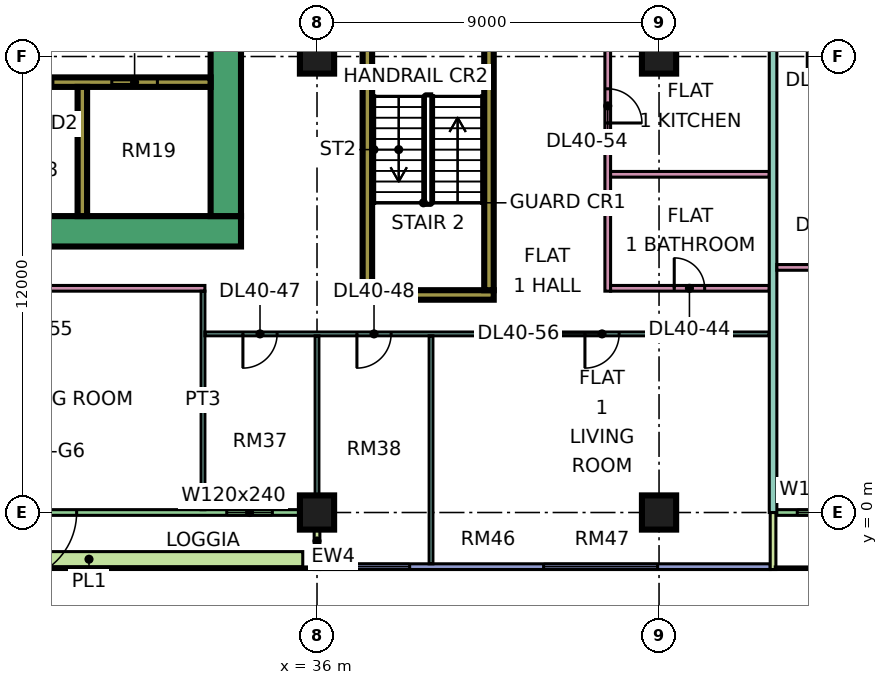
"""IFC4 building model, lengths in metres.
Left out: names, types, materials, properties, quantities, classifications, styles, units other than length and angle.
Written with IfcOpenShell. Run it as: python <this file> out.ifc"""

import sys

from ifc_helpers import new_model, si_unit, direction, frame, frame_2d, origin, origin_2d, place, context, subcontext, project, spatial, rectangle, extrude, element, fill, save


model = new_model("IFC4")
c1 = context("Model", 3, precision=1e-05, world=origin(), true_north=direction((0.0, 1.0)))
c2 = subcontext(c1, "Body", "Model", "MODEL_VIEW")
j1 = project(units=[si_unit("LENGTHUNIT", "METRE"), si_unit("PLANEANGLEUNIT", "RADIAN")], contexts=[c1])
p1 = place(None, origin())
s1 = spatial("IfcSite", under=j1, at=p1, CompositionType="ELEMENT")
p2 = place(p1, origin())
s2 = spatial("IfcBuilding", under=s1, at=p2, CompositionType="ELEMENT")
p3 = place(p2, frame((0.0, 0.0, 176.15)))
s3 = spatial("IfcBuildingStorey", under=s2, at=p3, CompositionType="ELEMENT", Elevation=176.15)
for number, where, z_axis, x_axis in (
    (1, (36.0, 0.0, 0.0), (0.0, 0.0, 1.0), (1.0, 0.0, 0.0)),
    (2, (36.0, 12.0, 0.0), (0.0, 0.0, 1.0), (1.0, 0.0, 0.0)),
    (3, (45.0, 0.0, 0.0), (0.0, 0.0, 1.0), (1.0, 0.0, 0.0)),
    (4, (45.0, 12.0, 0.0), (0.0, 0.0, 1.0), (1.0, 0.0, 0.0)),
):
    element("IfcColumn", number, at=place(p3, frame(where, z_axis=z_axis, x_axis=x_axis)), inside=s3, PredefinedType="COLUMN", context=c2, shape_type="SweptSolid", body=[
        extrude(rectangle(XDim=0.9, YDim=0.9, at=origin_2d()), origin(), (0.0, 0.0, 1.0), 3.75),
    ])
p4 = place(p3, frame((9.0, 7.4, 0.0), z_axis=(0.0, 0.0, 1.0), x_axis=(1.0, 0.0, 0.0)))
e5 = element("IfcWall", 5, at=p4, inside=s3, PredefinedType="SHEAR", context=c2, shape_type="SweptSolid", body=[
    extrude(rectangle(XDim=25.0, YDim=0.8, at=frame_2d((12.5, 0.0))), origin(), (0.0, 0.0, 1.0), 3.75),
])
p5 = place(p3, frame((33.6, 7.8, 0.0), z_axis=(0.0, 0.0, 1.0), x_axis=(0.0, 1.0, 0.0)))
e6 = element("IfcWall", 6, at=p5, inside=s3, PredefinedType="SHEAR", context=c2, shape_type="SweptSolid", body=[
    extrude(rectangle(XDim=11.4, YDim=0.8, at=frame_2d((5.7, 0.0))), origin(), (0.0, 0.0, 1.0), 3.75),
])
p6 = place(p5, frame((5.4, 0.0, 0.0)))
e7 = element("IfcOpeningElement", 7, at=p6, cuts=e6, PredefinedType="OPENING", context=c2, shape_type="SweptSolid", body=[
    extrude(rectangle(XDim=1.8, YDim=2.4, at=frame_2d((0.9, 1.2))), frame((0.0, 0.41, 0.0), z_axis=(0.0, -1.0, 0.0), x_axis=(1.0, 0.0, 0.0)), (0.0, 0.0, 1.0), 0.82),
])
p7 = place(p3, frame((13.45, 11.325, 0.0), z_axis=(0.0, 0.0, 1.0), x_axis=(1.0, 0.0, 0.0)))
e8 = element("IfcWall", 8, at=p7, inside=s3, PredefinedType="SHEAR", context=c2, shape_type="SweptSolid", body=[
    extrude(rectangle(XDim=19.75, YDim=0.25, at=frame_2d((9.875, 0.0))), origin(), (0.0, 0.0, 1.0), 3.75),
])
p8 = place(p7, frame((11.65, 0.0, 0.0)))
e9 = element("IfcOpeningElement", 9, at=p8, cuts=e8, PredefinedType="OPENING", context=c2, shape_type="SweptSolid", body=[
    extrude(rectangle(XDim=1.2, YDim=2.2, at=frame_2d((0.6, 1.1))), frame((0.0, 0.135, 0.0), z_axis=(0.0, -1.0, 0.0), x_axis=(1.0, 0.0, 0.0)), (0.0, 0.0, 1.0), 0.27),
])
p9 = place(p7, frame((14.4, 0.0, 0.0)))
e10 = element("IfcOpeningElement", 10, at=p9, cuts=e8, PredefinedType="OPENING", context=c2, shape_type="SweptSolid", body=[
    extrude(rectangle(XDim=1.2, YDim=2.2, at=frame_2d((0.6, 1.1))), frame((0.0, 0.135, 0.0), z_axis=(0.0, -1.0, 0.0), x_axis=(1.0, 0.0, 0.0)), (0.0, 0.0, 1.0), 0.27),
])
p10 = place(p7, frame((17.15, 0.0, 0.0)))
e11 = element("IfcOpeningElement", 11, at=p10, cuts=e8, PredefinedType="OPENING", context=c2, shape_type="SweptSolid", body=[
    extrude(rectangle(XDim=1.2, YDim=2.2, at=frame_2d((0.6, 1.1))), frame((0.0, 0.135, 0.0), z_axis=(0.0, -1.0, 0.0), x_axis=(1.0, 0.0, 0.0)), (0.0, 0.0, 1.0), 0.27),
])
p11 = place(p7, frame((1.55, 0.0, 0.0)))
e12 = element("IfcOpeningElement", 12, at=p11, cuts=e8, PredefinedType="OPENING", context=c2, shape_type="SweptSolid", body=[
    extrude(rectangle(XDim=0.9, YDim=2.1, at=frame_2d((0.45, 1.05))), frame((0.0, 0.135, 0.0), z_axis=(0.0, -1.0, 0.0), x_axis=(1.0, 0.0, 0.0)), (0.0, 0.0, 1.0), 0.27),
])
p12 = place(p7, frame((5.05, 0.0, 0.0)))
e13 = element("IfcOpeningElement", 13, at=p12, cuts=e8, PredefinedType="OPENING", context=c2, shape_type="SweptSolid", body=[
    extrude(rectangle(XDim=0.9, YDim=2.1, at=frame_2d((0.45, 1.05))), frame((0.0, 0.135, 0.0), z_axis=(0.0, -1.0, 0.0), x_axis=(1.0, 0.0, 0.0)), (0.0, 0.0, 1.0), 0.27),
])
p13 = place(p7, frame((8.425, 0.0, 0.0)))
e14 = element("IfcOpeningElement", 14, at=p13, cuts=e8, PredefinedType="OPENING", context=c2, shape_type="SweptSolid", body=[
    extrude(rectangle(XDim=0.9, YDim=2.1, at=frame_2d((0.45, 1.05))), frame((0.0, 0.135, 0.0), z_axis=(0.0, -1.0, 0.0), x_axis=(1.0, 0.0, 0.0)), (0.0, 0.0, 1.0), 0.27),
])
p14 = place(p3, frame((29.825, 7.8, 0.0), z_axis=(0.0, 0.0, 1.0), x_axis=(0.0, 1.0, 0.0)))
e15 = element("IfcWall", 15, at=p14, inside=s3, PredefinedType="SHEAR", context=c2, shape_type="SweptSolid", body=[
    extrude(rectangle(XDim=3.4, YDim=0.25, at=frame_2d((1.7, 0.0))), origin(), (0.0, 0.0, 1.0), 3.75),
])
p15 = place(p3, frame((37.2, 5.725, 0.0), z_axis=(0.0, 0.0, 1.0), x_axis=(1.0, 0.0, 0.0)))
e16 = element("IfcWall", 16, at=p15, inside=s3, PredefinedType="SHEAR", context=c2, shape_type="SweptSolid", body=[
    extrude(rectangle(XDim=3.45, YDim=0.25, at=frame_2d((1.725, 0.0))), origin(), (0.0, 0.0, 1.0), 3.75),
])
for number, where, z_axis, x_axis in (
    (17, (37.325, 5.85, 0.0), (0.0, 0.0, 1.0), (0.0, 1.0, 0.0)),
    (18, (40.525, 5.85, 0.0), (0.0, 0.0, 1.0), (0.0, 1.0, 0.0)),
):
    element("IfcWall", number, at=place(p3, frame(where, z_axis=z_axis, x_axis=x_axis)), inside=s3, PredefinedType="SHEAR", context=c2, shape_type="SweptSolid", body=[
        extrude(rectangle(XDim=6.5, YDim=0.25, at=frame_2d((3.25, 0.0))), origin(), (0.0, 0.0, 1.0), 3.75),
    ])
p16 = place(p3, frame((24.075, 0.0, 0.0), z_axis=(0.0, 0.0, 1.0), x_axis=(1.0, 0.0, 0.0)))
e19 = element("IfcWall", 19, at=p16, inside=s3, PredefinedType="SOLIDWALL", context=c2, shape_type="SweptSolid", body=[
    extrude(rectangle(XDim=11.85, YDim=0.15, at=frame_2d((5.925, 0.0))), origin(), (0.0, 0.0, 1.0), 3.35),
])
p17 = place(p16, frame((3.8, 0.0, 0.0)))
e20 = element("IfcOpeningElement", 20, at=p17, cuts=e19, PredefinedType="OPENING", context=c2, shape_type="SweptSolid", body=[
    extrude(rectangle(XDim=1.8, YDim=2.4, at=frame_2d((0.9, 1.2))), frame((0.0, 0.085, 0.0), z_axis=(0.0, -1.0, 0.0), x_axis=(1.0, 0.0, 0.0)), (0.0, 0.0, 1.0), 0.17),
])
p18 = place(p16, frame((9.55, 0.0, 0.45)))
e21 = element("IfcOpeningElement", 21, at=p18, cuts=e19, PredefinedType="OPENING", context=c2, shape_type="SweptSolid", body=[
    extrude(rectangle(XDim=1.2, YDim=2.4, at=frame_2d((0.6, 1.2))), frame((0.0, 0.085, 0.0), z_axis=(0.0, -1.0, 0.0), x_axis=(1.0, 0.0, 0.0)), (0.0, 0.0, 1.0), 0.17),
])
p19 = place(p3, frame((36.0, -1.5, 0.0), z_axis=(0.0, 0.0, 1.0), x_axis=(0.0, 1.0, 0.0)))
e22 = element("IfcWall", 22, at=p19, inside=s3, PredefinedType="SOLIDWALL", context=c2, shape_type="SweptSolid", body=[
    extrude(rectangle(XDim=1.5, YDim=0.15, at=frame_2d((0.75, 0.0))), origin(), (0.0, 0.0, 1.0), 3.35),
])
p20 = place(p3, frame((36.075, -1.425, 0.0), z_axis=(0.0, 0.0, 1.0), x_axis=(1.0, 0.0, 0.0)))
e23 = element("IfcWall", 23, at=p20, inside=s3, PredefinedType="SOLIDWALL", context=c2, shape_type="SweptSolid", body=[
    extrude(rectangle(XDim=11.85, YDim=0.15, at=frame_2d((5.925, 0.0))), origin(), (0.0, 0.0, 1.0), 3.35),
])
p21 = place(p20, frame((0.562, 0.0, 0.45)))
e24 = element("IfcOpeningElement", 24, at=p21, cuts=e23, PredefinedType="OPENING", context=c2, shape_type="SweptSolid", body=[
    extrude(rectangle(XDim=1.8, YDim=2.4, at=frame_2d((0.9, 1.2))), frame((0.0, 0.085, 0.0), z_axis=(0.0, -1.0, 0.0), x_axis=(1.0, 0.0, 0.0)), (0.0, 0.0, 1.0), 0.17),
])
p22 = place(p20, frame((5.887, 0.0, 0.45)))
e25 = element("IfcOpeningElement", 25, at=p22, cuts=e23, PredefinedType="OPENING", context=c2, shape_type="SweptSolid", body=[
    extrude(rectangle(XDim=3.0, YDim=2.4, at=frame_2d((1.5, 1.2))), frame((0.0, 0.085, 0.0), z_axis=(0.0, -1.0, 0.0), x_axis=(1.0, 0.0, 0.0)), (0.0, 0.0, 1.0), 0.17),
])
p23 = place(p3, frame((48.075, 0.0, 0.0), z_axis=(0.0, 0.0, 1.0), x_axis=(1.0, 0.0, 0.0)))
e26 = element("IfcWall", 26, at=p23, inside=s3, PredefinedType="SOLIDWALL", context=c2, shape_type="SweptSolid", body=[
    extrude(rectangle(XDim=13.35, YDim=0.15, at=frame_2d((6.675, 0.0))), origin(), (0.0, 0.0, 1.0), 3.35),
])
p24 = place(p23, frame((0.562, 0.0, 0.45)))
e27 = element("IfcOpeningElement", 27, at=p24, cuts=e26, PredefinedType="OPENING", context=c2, shape_type="SweptSolid", body=[
    extrude(rectangle(XDim=1.8, YDim=2.4, at=frame_2d((0.9, 1.2))), frame((0.0, 0.085, 0.0), z_axis=(0.0, -1.0, 0.0), x_axis=(1.0, 0.0, 0.0)), (0.0, 0.0, 1.0), 0.17),
])
p25 = place(p23, frame((3.55, 0.0, 0.0)))
e28 = element("IfcOpeningElement", 28, at=p25, cuts=e26, PredefinedType="OPENING", context=c2, shape_type="SweptSolid", body=[
    extrude(rectangle(XDim=1.2, YDim=2.4, at=frame_2d((0.6, 1.2))), frame((0.0, 0.085, 0.0), z_axis=(0.0, -1.0, 0.0), x_axis=(1.0, 0.0, 0.0)), (0.0, 0.0, 1.0), 0.17),
])
p26 = place(p23, frame((7.1, 0.0, 0.45)))
e29 = element("IfcOpeningElement", 29, at=p26, cuts=e26, PredefinedType="OPENING", context=c2, shape_type="SweptSolid", body=[
    extrude(rectangle(XDim=1.2, YDim=2.4, at=frame_2d((0.6, 1.2))), frame((0.0, 0.085, 0.0), z_axis=(0.0, -1.0, 0.0), x_axis=(1.0, 0.0, 0.0)), (0.0, 0.0, 1.0), 0.17),
])
p27 = place(p23, frame((9.637, 0.0, 0.45)))
e30 = element("IfcOpeningElement", 30, at=p27, cuts=e26, PredefinedType="OPENING", context=c2, shape_type="SweptSolid", body=[
    extrude(rectangle(XDim=3.0, YDim=2.4, at=frame_2d((1.5, 1.2))), frame((0.0, 0.085, 0.0), z_axis=(0.0, -1.0, 0.0), x_axis=(1.0, 0.0, 0.0)), (0.0, 0.0, 1.0), 0.17),
])
p28 = place(p3, frame((48.0, -1.5, 0.0), z_axis=(0.0, 0.0, 1.0), x_axis=(0.0, 1.0, 0.0)))
e31 = element("IfcWall", 31, at=p28, inside=s3, PredefinedType="SOLIDWALL", context=c2, shape_type="SweptSolid", body=[
    extrude(rectangle(XDim=1.5, YDim=0.15, at=frame_2d((0.75, 0.0))), origin(), (0.0, 0.0, 1.0), 3.35),
])
p29 = place(p3, frame((24.375, -1.229, 0.0), z_axis=(0.0, 0.0, 1.0), x_axis=(1.0, 0.0, 0.0)))
e32 = element("IfcWall", 32, at=p29, inside=s3, PredefinedType="SOLIDWALL", context=c2, shape_type="SweptSolid", body=[
    extrude(rectangle(XDim=11.25, YDim=0.4, at=frame_2d((5.625, 0.0))), origin(), (0.0, 0.0, 1.0), 0.7),
])
p30 = place(p3, frame((11.95, 5.9, 0.0), z_axis=(0.0, 0.0, 1.0), x_axis=(1.0, 0.0, 0.0)))
e33 = element("IfcWall", 33, at=p30, inside=s3, PredefinedType="PARTITIONING", context=c2, shape_type="SweptSolid", body=[
    extrude(rectangle(XDim=21.1, YDim=0.15, at=frame_2d((10.55, 0.0))), origin(), (0.0, 0.0, 1.0), 3.35),
])
p31 = place(p30, frame((1.1, 0.0, 0.0)))
e34 = element("IfcOpeningElement", 34, at=p31, cuts=e33, PredefinedType="OPENING", context=c2, shape_type="SweptSolid", body=[
    extrude(rectangle(XDim=0.9, YDim=2.1, at=frame_2d((0.45, 1.05))), frame((0.0, 0.085, 0.0), z_axis=(0.0, -1.0, 0.0), x_axis=(1.0, 0.0, 0.0)), (0.0, 0.0, 1.0), 0.17),
])
p32 = place(p30, frame((4.1, 0.0, 0.0)))
e35 = element("IfcOpeningElement", 35, at=p32, cuts=e33, PredefinedType="OPENING", context=c2, shape_type="SweptSolid", body=[
    extrude(rectangle(XDim=0.9, YDim=2.1, at=frame_2d((0.45, 1.05))), frame((0.0, 0.085, 0.0), z_axis=(0.0, -1.0, 0.0), x_axis=(1.0, 0.0, 0.0)), (0.0, 0.0, 1.0), 0.17),
])
p33 = place(p30, frame((10.1, 0.0, 0.0)))
e36 = element("IfcOpeningElement", 36, at=p33, cuts=e33, PredefinedType="OPENING", context=c2, shape_type="SweptSolid", body=[
    extrude(rectangle(XDim=0.9, YDim=2.1, at=frame_2d((0.45, 1.05))), frame((0.0, 0.085, 0.0), z_axis=(0.0, -1.0, 0.0), x_axis=(1.0, 0.0, 0.0)), (0.0, 0.0, 1.0), 0.17),
])
p34 = place(p30, frame((16.1, 0.0, 0.0)))
e37 = element("IfcOpeningElement", 37, at=p34, cuts=e33, PredefinedType="OPENING", context=c2, shape_type="SweptSolid", body=[
    extrude(rectangle(XDim=0.9, YDim=2.1, at=frame_2d((0.45, 1.05))), frame((0.0, 0.085, 0.0), z_axis=(0.0, -1.0, 0.0), x_axis=(1.0, 0.0, 0.0)), (0.0, 0.0, 1.0), 0.17),
])
p35 = place(p3, frame((33.0, 0.074, 0.0), z_axis=(0.0, 0.0, 1.0), x_axis=(0.0, 1.0, 0.0)))
e38 = element("IfcWall", 38, at=p35, inside=s3, PredefinedType="PARTITIONING", context=c2, shape_type="SweptSolid", body=[
    extrude(rectangle(XDim=5.751, YDim=0.1, at=frame_2d((2.875, 0.0))), origin(), (0.0, 0.0, 1.0), 3.35),
])
p36 = place(p3, frame((33.05, 4.7, 0.0), z_axis=(0.0, 0.0, 1.0), x_axis=(1.0, 0.0, 0.0)))
e39 = element("IfcWall", 39, at=p36, inside=s3, PredefinedType="PARTITIONING", context=c2, shape_type="SweptSolid", body=[
    extrude(rectangle(XDim=14.85, YDim=0.1, at=frame_2d((7.425, 0.0))), origin(), (0.0, 0.0, 1.0), 3.35),
])
p37 = place(p36, frame((1.0, 0.0, 0.0)))
e40 = element("IfcOpeningElement", 40, at=p37, cuts=e39, PredefinedType="OPENING", context=c2, shape_type="SweptSolid", body=[
    extrude(rectangle(XDim=0.9, YDim=2.1, at=frame_2d((0.45, 1.05))), frame((0.0, 0.06, 0.0), z_axis=(0.0, -1.0, 0.0), x_axis=(1.0, 0.0, 0.0)), (0.0, 0.0, 1.0), 0.12),
])
p38 = place(p36, frame((4.0, 0.0, 0.0)))
e41 = element("IfcOpeningElement", 41, at=p38, cuts=e39, PredefinedType="OPENING", context=c2, shape_type="SweptSolid", body=[
    extrude(rectangle(XDim=0.9, YDim=2.1, at=frame_2d((0.45, 1.05))), frame((0.0, 0.06, 0.0), z_axis=(0.0, -1.0, 0.0), x_axis=(1.0, 0.0, 0.0)), (0.0, 0.0, 1.0), 0.12),
])
p39 = place(p36, frame((10.0, 0.0, 0.0)))
e42 = element("IfcOpeningElement", 42, at=p39, cuts=e39, PredefinedType="OPENING", context=c2, shape_type="SweptSolid", body=[
    extrude(rectangle(XDim=0.9, YDim=2.1, at=frame_2d((0.45, 1.05))), frame((0.0, 0.06, 0.0), z_axis=(0.0, -1.0, 0.0), x_axis=(1.0, 0.0, 0.0)), (0.0, 0.0, 1.0), 0.12),
])
p40 = place(p3, frame((36.0, 0.0, 0.0), z_axis=(0.0, 0.0, 1.0), x_axis=(0.0, 1.0, 0.0)))
e43 = element("IfcWall", 43, at=p40, inside=s3, PredefinedType="PARTITIONING", context=c2, shape_type="SweptSolid", body=[
    extrude(rectangle(XDim=4.65, YDim=0.1, at=frame_2d((2.325, 0.0))), origin(), (0.0, 0.0, 1.0), 3.35),
])
p41 = place(p3, frame((39.0, -1.35, 0.0), z_axis=(0.0, 0.0, 1.0), x_axis=(0.0, 1.0, 0.0)))
e44 = element("IfcWall", 44, at=p41, inside=s3, PredefinedType="PARTITIONING", context=c2, shape_type="SweptSolid", body=[
    extrude(rectangle(XDim=6.0, YDim=0.1, at=frame_2d((3.0, 0.0))), origin(), (0.0, 0.0, 1.0), 3.35),
])
p42 = place(p3, frame((43.65, 5.825, 0.0), z_axis=(0.0, 0.0, 1.0), x_axis=(0.0, 1.0, 0.0)))
e45 = element("IfcWall", 45, at=p42, inside=s3, PredefinedType="PARTITIONING", context=c2, shape_type="SweptSolid", body=[
    extrude(rectangle(XDim=6.525, YDim=0.15, at=frame_2d((3.263, 0.0))), origin(), (0.0, 0.0, 1.0), 3.35),
])
p43 = place(p42, frame((4.425, 0.0, 0.0)))
e46 = element("IfcOpeningElement", 46, at=p43, cuts=e45, PredefinedType="OPENING", context=c2, shape_type="SweptSolid", body=[
    extrude(rectangle(XDim=0.9, YDim=2.1, at=frame_2d((0.45, 1.05))), frame((0.0, 0.085, 0.0), z_axis=(0.0, -1.0, 0.0), x_axis=(1.0, 0.0, 0.0)), (0.0, 0.0, 1.0), 0.17),
])
p44 = place(p3, frame((43.725, 5.9, 0.0), z_axis=(0.0, 0.0, 1.0), x_axis=(1.0, 0.0, 0.0)))
e47 = element("IfcWall", 47, at=p44, inside=s3, PredefinedType="PARTITIONING", context=c2, shape_type="SweptSolid", body=[
    extrude(rectangle(XDim=4.175, YDim=0.15, at=frame_2d((2.087, 0.0))), origin(), (0.0, 0.0, 1.0), 3.35),
])
p45 = place(p44, frame((1.675, 0.0, 0.0)))
e48 = element("IfcOpeningElement", 48, at=p45, cuts=e47, PredefinedType="OPENING", context=c2, shape_type="SweptSolid", body=[
    extrude(rectangle(XDim=0.8, YDim=2.1, at=frame_2d((0.4, 1.05))), frame((0.0, 0.085, 0.0), z_axis=(0.0, -1.0, 0.0), x_axis=(1.0, 0.0, 0.0)), (0.0, 0.0, 1.0), 0.17),
])
p46 = place(p3, frame((43.725, 8.9, 0.0), z_axis=(0.0, 0.0, 1.0), x_axis=(1.0, 0.0, 0.0)))
e49 = element("IfcWall", 49, at=p46, inside=s3, PredefinedType="PARTITIONING", context=c2, shape_type="SweptSolid", body=[
    extrude(rectangle(XDim=4.175, YDim=0.15, at=frame_2d((2.087, 0.0))), origin(), (0.0, 0.0, 1.0), 3.35),
])
p47 = place(p3, frame((48.0, 0.0, 0.0), z_axis=(0.0, 0.0, 1.0), x_axis=(0.0, 1.0, 0.0)))
e50 = element("IfcWall", 50, at=p47, inside=s3, PredefinedType="PARTITIONING", context=c2, shape_type="SweptSolid", body=[
    extrude(rectangle(XDim=12.35, YDim=0.2, at=frame_2d((6.175, 0.0))), origin(), (0.0, 0.0, 1.0), 3.35),
])
p48 = place(p3, frame((48.1, 6.45, 0.0), z_axis=(0.0, 0.0, 1.0), x_axis=(1.0, 0.0, 0.0)))
e51 = element("IfcWall", 51, at=p48, inside=s3, PredefinedType="PARTITIONING", context=c2, shape_type="SweptSolid", body=[
    extrude(rectangle(XDim=8.95, YDim=0.15, at=frame_2d((4.475, 0.0))), origin(), (0.0, 0.0, 1.0), 3.35),
])
p49 = place(p48, frame((0.95, 0.0, 0.0)))
e52 = element("IfcOpeningElement", 52, at=p49, cuts=e51, PredefinedType="OPENING", context=c2, shape_type="SweptSolid", body=[
    extrude(rectangle(XDim=0.9, YDim=2.1, at=frame_2d((0.45, 1.05))), frame((0.0, 0.085, 0.0), z_axis=(0.0, -1.0, 0.0), x_axis=(1.0, 0.0, 0.0)), (0.0, 0.0, 1.0), 0.17),
])
p50 = place(p48, frame((6.95, 0.0, 0.0)))
e53 = element("IfcOpeningElement", 53, at=p50, cuts=e51, PredefinedType="OPENING", context=c2, shape_type="SweptSolid", body=[
    extrude(rectangle(XDim=0.9, YDim=2.1, at=frame_2d((0.45, 1.05))), frame((0.0, 0.085, 0.0), z_axis=(0.0, -1.0, 0.0), x_axis=(1.0, 0.0, 0.0)), (0.0, 0.0, 1.0), 0.17),
])
p51 = place(p17, frame((1.8, 0.0, 0.0), z_axis=(0.0, 0.0, 1.0), x_axis=(-1.0, 0.0, 0.0)))
e54 = element("IfcDoor", 54, at=p51, inside=s3, OperationType="DOUBLE_DOOR_SINGLE_SWING", PredefinedType="DOOR", context=c2, shape_type="SweptSolid", body=[
    extrude(rectangle(XDim=1.8, YDim=2.4, at=frame_2d((0.9, 1.2))), frame((0.0, 0.025, 0.0), z_axis=(0.0, -1.0, 0.0), x_axis=(1.0, 0.0, 0.0)), (0.0, 0.0, 1.0), 0.05),
])
fill(e20, e54)
p52 = place(p18, origin())
e55 = element("IfcWindow", 55, at=p52, inside=s3, PartitioningType="SINGLE_PANEL", PredefinedType="WINDOW", context=c2, shape_type="SweptSolid", body=[
    extrude(rectangle(XDim=1.2, YDim=2.4, at=frame_2d((0.6, 1.2))), frame((0.0, 0.03, 0.0), z_axis=(0.0, -1.0, 0.0), x_axis=(1.0, 0.0, 0.0)), (0.0, 0.0, 1.0), 0.06),
])
fill(e21, e55)
p53 = place(p21, origin())
e56 = element("IfcWindow", 56, at=p53, inside=s3, PartitioningType="SINGLE_PANEL", PredefinedType="WINDOW", context=c2, shape_type="SweptSolid", body=[
    extrude(rectangle(XDim=1.8, YDim=2.4, at=frame_2d((0.9, 1.2))), frame((0.0, 0.03, 0.0), z_axis=(0.0, -1.0, 0.0), x_axis=(1.0, 0.0, 0.0)), (0.0, 0.0, 1.0), 0.06),
])
fill(e24, e56)
p54 = place(p22, origin())
e57 = element("IfcWindow", 57, at=p54, inside=s3, PartitioningType="SINGLE_PANEL", PredefinedType="WINDOW", context=c2, shape_type="SweptSolid", body=[
    extrude(rectangle(XDim=3.0, YDim=2.4, at=frame_2d((1.5, 1.2))), frame((0.0, 0.03, 0.0), z_axis=(0.0, -1.0, 0.0), x_axis=(1.0, 0.0, 0.0)), (0.0, 0.0, 1.0), 0.06),
])
fill(e25, e57)
p55 = place(p24, origin())
e58 = element("IfcWindow", 58, at=p55, inside=s3, PartitioningType="SINGLE_PANEL", PredefinedType="WINDOW", context=c2, shape_type="SweptSolid", body=[
    extrude(rectangle(XDim=1.8, YDim=2.4, at=frame_2d((0.9, 1.2))), frame((0.0, 0.03, 0.0), z_axis=(0.0, -1.0, 0.0), x_axis=(1.0, 0.0, 0.0)), (0.0, 0.0, 1.0), 0.06),
])
fill(e27, e58)
p56 = place(p9, origin())
e59 = element("IfcDoor", 59, at=p56, inside=s3, OperationType="DOUBLE_DOOR_SLIDING", PredefinedType="DOOR", context=c2, shape_type="SweptSolid", body=[
    extrude(rectangle(XDim=1.2, YDim=2.2, at=frame_2d((0.6, 1.1))), frame((0.0, 0.025, 0.0), z_axis=(0.0, -1.0, 0.0), x_axis=(1.0, 0.0, 0.0)), (0.0, 0.0, 1.0), 0.05),
])
fill(e10, e59)
p57 = place(p10, origin())
e60 = element("IfcDoor", 60, at=p57, inside=s3, OperationType="DOUBLE_DOOR_SLIDING", PredefinedType="DOOR", context=c2, shape_type="SweptSolid", body=[
    extrude(rectangle(XDim=1.2, YDim=2.2, at=frame_2d((0.6, 1.1))), frame((0.0, 0.025, 0.0), z_axis=(0.0, -1.0, 0.0), x_axis=(1.0, 0.0, 0.0)), (0.0, 0.0, 1.0), 0.05),
])
fill(e11, e60)
p58 = place(p45, origin())
e61 = element("IfcDoor", 61, at=p58, inside=s3, OperationType="SINGLE_SWING_LEFT", PredefinedType="DOOR", context=c2, shape_type="SweptSolid", body=[
    extrude(rectangle(XDim=0.8, YDim=2.1, at=frame_2d((0.4, 1.05))), frame((0.0, 0.025, 0.0), z_axis=(0.0, -1.0, 0.0), x_axis=(1.0, 0.0, 0.0)), (0.0, 0.0, 1.0), 0.05),
])
fill(e48, e61)
p59 = place(p37, frame((0.9, 0.0, 0.0), z_axis=(0.0, 0.0, 1.0), x_axis=(-1.0, 0.0, 0.0)))
e62 = element("IfcDoor", 62, at=p59, inside=s3, OperationType="SINGLE_SWING_LEFT", PredefinedType="DOOR", context=c2, shape_type="SweptSolid", body=[
    extrude(rectangle(XDim=0.9, YDim=2.1, at=frame_2d((0.45, 1.05))), frame((0.0, 0.025, 0.0), z_axis=(0.0, -1.0, 0.0), x_axis=(1.0, 0.0, 0.0)), (0.0, 0.0, 1.0), 0.05),
])
fill(e40, e62)
p60 = place(p38, frame((0.9, 0.0, 0.0), z_axis=(0.0, 0.0, 1.0), x_axis=(-1.0, 0.0, 0.0)))
e63 = element("IfcDoor", 63, at=p60, inside=s3, OperationType="SINGLE_SWING_LEFT", PredefinedType="DOOR", context=c2, shape_type="SweptSolid", body=[
    extrude(rectangle(XDim=0.9, YDim=2.1, at=frame_2d((0.45, 1.05))), frame((0.0, 0.025, 0.0), z_axis=(0.0, -1.0, 0.0), x_axis=(1.0, 0.0, 0.0)), (0.0, 0.0, 1.0), 0.05),
])
fill(e41, e63)
p61 = place(p43, frame((0.9, 0.0, 0.0), z_axis=(0.0, 0.0, 1.0), x_axis=(-1.0, 0.0, 0.0)))
e64 = element("IfcDoor", 64, at=p61, inside=s3, OperationType="SINGLE_SWING_LEFT", PredefinedType="DOOR", context=c2, shape_type="SweptSolid", body=[
    extrude(rectangle(XDim=0.9, YDim=2.1, at=frame_2d((0.45, 1.05))), frame((0.0, 0.025, 0.0), z_axis=(0.0, -1.0, 0.0), x_axis=(1.0, 0.0, 0.0)), (0.0, 0.0, 1.0), 0.05),
])
fill(e46, e64)
p62 = place(p39, frame((0.9, 0.0, 0.0), z_axis=(0.0, 0.0, 1.0), x_axis=(-1.0, 0.0, 0.0)))
e65 = element("IfcDoor", 65, at=p62, inside=s3, OperationType="SINGLE_SWING_LEFT", PredefinedType="DOOR", context=c2, shape_type="SweptSolid", body=[
    extrude(rectangle(XDim=0.9, YDim=2.1, at=frame_2d((0.45, 1.05))), frame((0.0, 0.025, 0.0), z_axis=(0.0, -1.0, 0.0), x_axis=(1.0, 0.0, 0.0)), (0.0, 0.0, 1.0), 0.05),
])
fill(e42, e65)
save(model, sys.argv[1])
